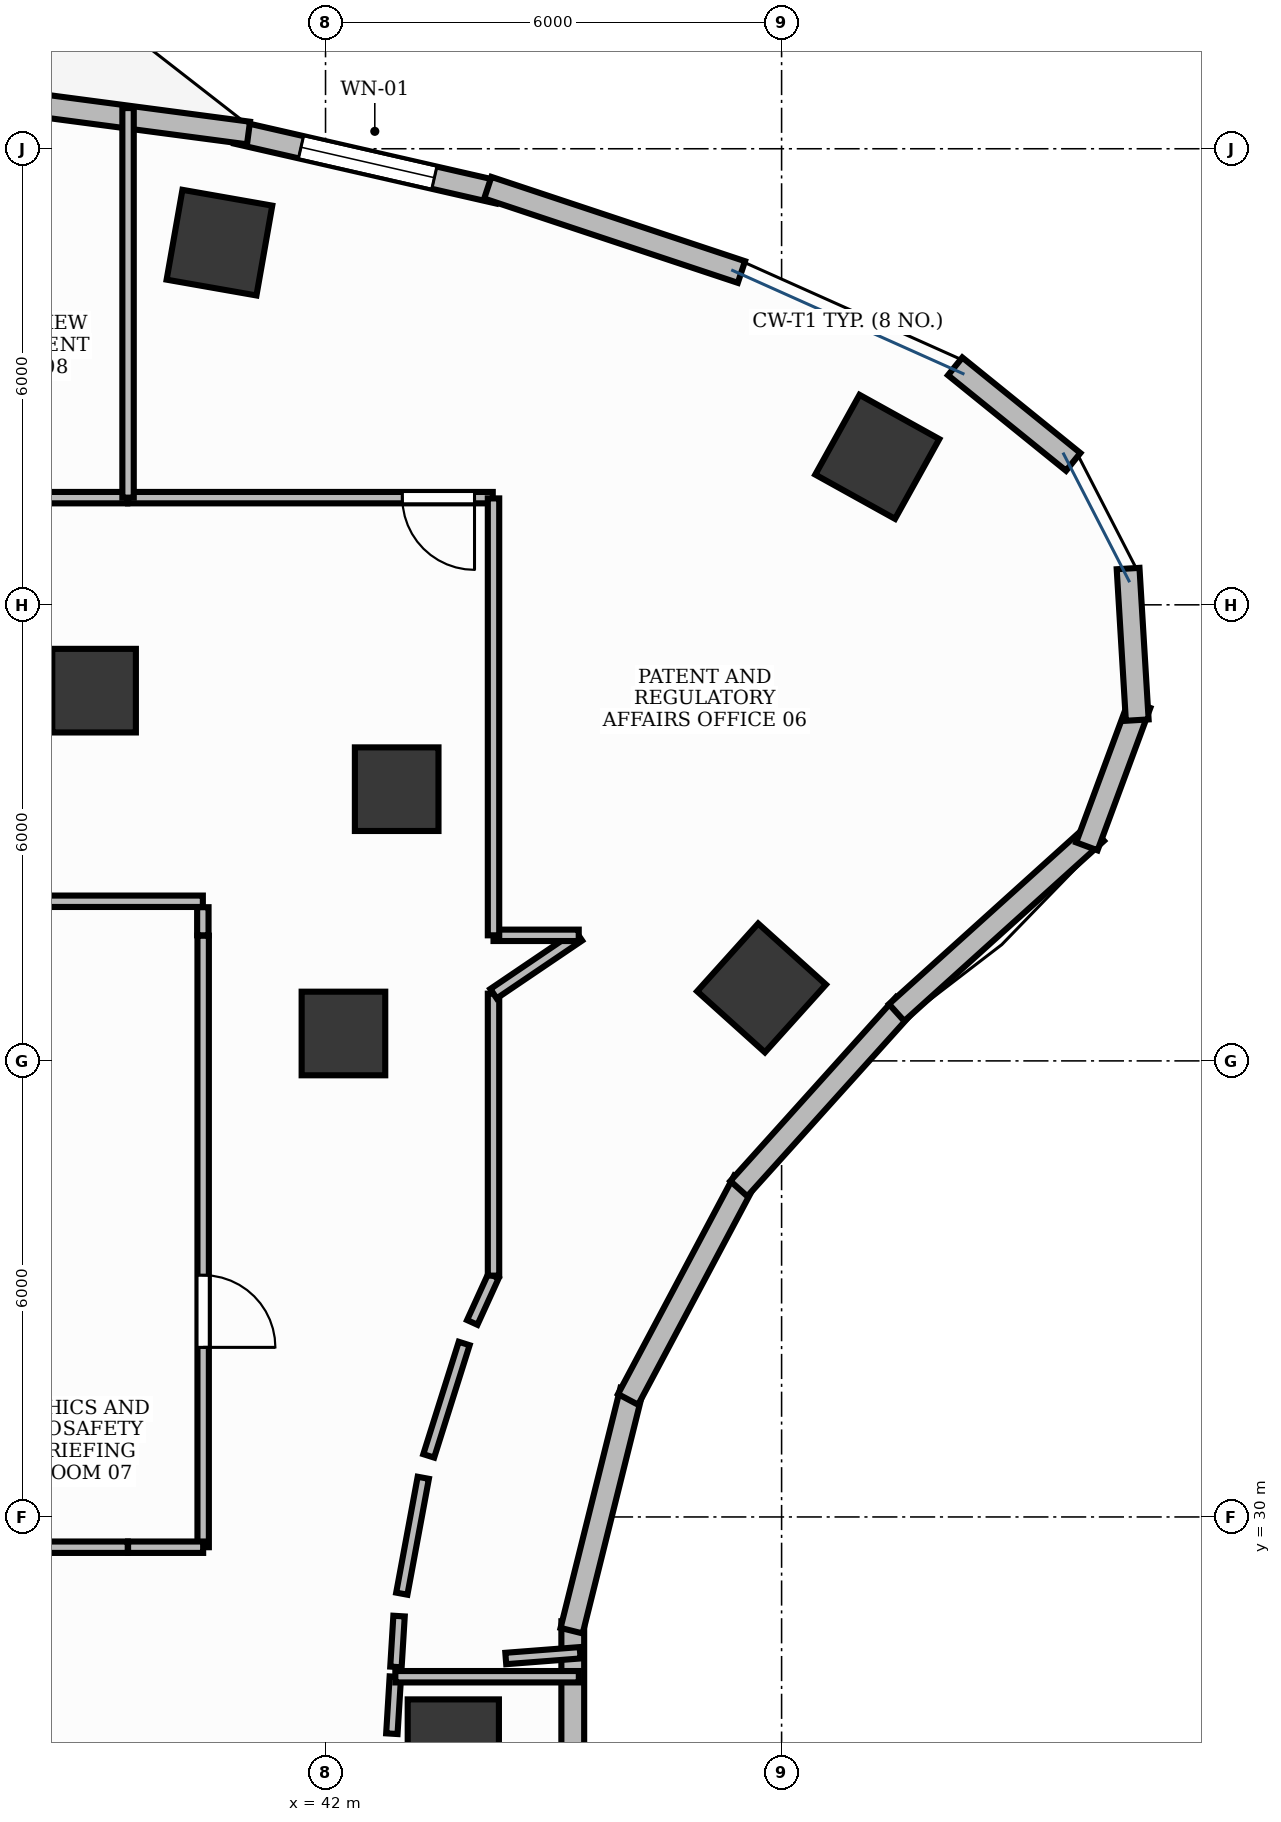
"""IFC4 building model, lengths in metres.
Left out: names, types, materials, properties, quantities, classifications, styles, units other than length and angle.
Written with IfcOpenShell. Run it as: python <this file> out.ifc"""

import sys

from ifc_helpers import new_model, si_unit, direction, frame, frame_2d, origin, origin_2d, place, context, subcontext, project, spatial, rectangle, extrude, element, fill, save


model = new_model("IFC4")
c1 = context("Model", 3, precision=1e-05, world=origin(), true_north=direction((0.0, 1.0)))
c2 = subcontext(c1, "Body", "Model", "MODEL_VIEW")
j1 = project(units=[si_unit("LENGTHUNIT", "METRE"), si_unit("PLANEANGLEUNIT", "RADIAN")], contexts=[c1])
p1 = place(None, origin())
s1 = spatial("IfcSite", under=j1, at=p1, CompositionType="ELEMENT")
p2 = place(p1, origin())
s2 = spatial("IfcBuilding", under=s1, at=p2, CompositionType="ELEMENT")
p3 = place(p2, frame((0.0, 0.0, 127.8)))
s3 = spatial("IfcBuildingStorey", under=s2, at=p3, CompositionType="ELEMENT", Elevation=127.8)
p4 = place(p3, frame((49.259, 43.947, -0.0), z_axis=(0.0, 0.0, 1.0), x_axis=(-0.874535078577, 0.484962262797, 0.0)))
e1 = element("IfcColumn", 1, at=p4, inside=s3, PredefinedType="COLUMN", context=c2, shape_type="SweptSolid", body=[
    extrude(rectangle(XDim=1.2, YDim=1.2, at=origin_2d()), origin(), (0.0, 0.0, 1.0), 3.901),
])
p5 = place(p3, frame((42.936, 39.575, -0.0), z_axis=(0.0, 0.0, 1.0), x_axis=(1.0, 0.0, 0.0)))
e2 = element("IfcColumn", 2, at=p5, inside=s3, PredefinedType="COLUMN", context=c2, shape_type="SweptSolid", body=[
    extrude(rectangle(XDim=1.1, YDim=1.1, at=origin_2d()), origin(), (0.0, 0.0, 1.0), 3.901),
])
p6 = place(p3, frame((40.604, 46.765, -0.0), z_axis=(0.0, 0.0, 1.0), x_axis=(-0.984868307662, 0.173304404339, 0.0)))
e3 = element("IfcColumn", 3, at=p6, inside=s3, PredefinedType="COLUMN", context=c2, shape_type="SweptSolid", body=[
    extrude(rectangle(XDim=1.2, YDim=1.2, at=origin_2d()), origin(), (0.0, 0.0, 1.0), 3.901),
])
p7 = place(p3, frame((38.955, 40.871, -0.0), z_axis=(0.0, 0.0, 1.0), x_axis=(1.0, 0.0, 0.0)))
e4 = element("IfcColumn", 4, at=p7, inside=s3, PredefinedType="COLUMN", context=c2, shape_type="SweptSolid", body=[
    extrude(rectangle(XDim=1.1, YDim=1.1, at=origin_2d()), origin(), (0.0, 0.0, 1.0), 3.901),
])
for number, where, z_axis, x_axis in (
    (5, (43.681, 27.0, -0.0), (0.0, 0.0, 1.0), (0.0, 1.0, 0.0)),
    (6, (47.736, 36.96, -0.0), (0.0, 0.0, 1.0), (0.669, 0.743, 0.0)),
):
    element("IfcColumn", number, at=place(p3, frame(where, z_axis=z_axis, x_axis=x_axis)), inside=s3, PredefinedType="COLUMN", context=c2, shape_type="SweptSolid", body=[
        extrude(rectangle(XDim=1.2, YDim=1.2, at=origin_2d()), origin(), (0.0, 0.0, 1.0), 3.901),
    ])
p8 = place(p3, frame((42.236, 36.361, -0.0), z_axis=(0.0, 0.0, 1.0), x_axis=(1.0, 0.0, 0.0)))
e7 = element("IfcColumn", 7, at=p8, inside=s3, PredefinedType="COLUMN", context=c2, shape_type="SweptSolid", body=[
    extrude(rectangle(XDim=1.1, YDim=1.1, at=origin_2d()), origin(), (0.0, 0.0, 1.0), 3.901),
])
p9 = place(p3, frame((44.278, 47.426, 0.0), z_axis=(0.0, 0.0, 1.0), x_axis=(-0.974836214244, 0.222922307989, 0.0)))
e8 = element("IfcWall", 8, at=p9, inside=s3, PredefinedType="STANDARD", context=c2, shape_type="SweptSolid", body=[
    extrude(rectangle(XDim=3.535, YDim=0.3, at=frame_2d((1.768, 0.0))), origin(), (0.0, 0.0, 1.0), 3.9),
])
p10 = place(p9, frame((0.868, 0.0, 0.9)))
e9 = element("IfcOpeningElement", 9, at=p10, cuts=e8, PredefinedType="OPENING", context=c2, shape_type="SweptSolid", body=[
    extrude(rectangle(XDim=1.8, YDim=2.1, at=frame_2d((0.9, 1.05))), frame((0.0, 0.165, 0.0), z_axis=(0.0, -1.0, 0.0), x_axis=(1.0, 0.0, 0.0)), (0.0, 0.0, 1.0), 0.33),
])
p11 = place(p3, frame((47.471, 46.378, 0.0), z_axis=(0.0, 0.0, 1.0), x_axis=(-0.948946814906, 0.315436114737, 0.0)))
e10 = element("IfcWall", 10, at=p11, inside=s3, PredefinedType="STANDARD", context=c2, shape_type="SweptSolid", body=[
    extrude(rectangle(XDim=3.516, YDim=0.3, at=frame_2d((1.758, 0.0))), origin(), (0.0, 0.0, 1.0), 3.9),
])
p12 = place(p3, frame((40.987, 48.207, 0.0), z_axis=(0.0, 0.0, 1.0), x_axis=(-0.991372969521, 0.131071107816, 0.0)))
e11 = element("IfcWall", 11, at=p12, inside=s3, PredefinedType="STANDARD", context=c2, shape_type="SweptSolid", body=[
    extrude(rectangle(XDim=3.615, YDim=0.3, at=frame_2d((1.808, 0.0))), origin(), (0.0, 0.0, 1.0), 3.47),
])
p13 = place(p3, frame((45.253, 25.372, 0.0), z_axis=(0.0, 0.0, 1.0), x_axis=(0.0, 1.0, 0.0)))
e12 = element("IfcWall", 12, at=p13, inside=s3, PredefinedType="STANDARD", context=c2, shape_type="SweptSolid", body=[
    extrude(rectangle(XDim=3.255, YDim=0.3, at=frame_2d((1.628, 0.0))), origin(), (0.0, 0.0, 1.0), 3.9),
])
p14 = place(p3, frame((45.238, 28.504, 0.0), z_axis=(0.0, 0.0, 1.0), x_axis=(0.241900409149, 0.970301083197, 0.0)))
e13 = element("IfcWall", 13, at=p14, inside=s3, PredefinedType="STANDARD", context=c2, shape_type="SweptSolid", body=[
    extrude(rectangle(XDim=3.256, YDim=0.3, at=frame_2d((1.628, 0.0))), origin(), (0.0, 0.0, 1.0), 3.9),
])
p15 = place(p3, frame((45.98, 31.547, 0.0), z_axis=(0.0, 0.0, 1.0), x_axis=(0.469451284634, 0.882958374645, 0.0)))
e14 = element("IfcWall", 14, at=p15, inside=s3, PredefinedType="STANDARD", context=c2, shape_type="SweptSolid", body=[
    extrude(rectangle(XDim=3.256, YDim=0.3, at=frame_2d((1.628, 0.0))), origin(), (0.0, 0.0, 1.0), 3.9),
])
p16 = place(p3, frame((47.437, 34.319, 0.0), z_axis=(0.0, 0.0, 1.0), x_axis=(0.669167727967, 0.743111399353, 0.0)))
e15 = element("IfcWall", 15, at=p16, inside=s3, PredefinedType="STANDARD", context=c2, shape_type="SweptSolid", body=[
    extrude(rectangle(XDim=3.255, YDim=0.3, at=frame_2d((1.628, 0.0))), origin(), (0.0, 0.0, 1.0), 3.9),
])
p17 = place(p3, frame((49.513, 36.636, 0.0), z_axis=(0.0, 0.0, 1.0), x_axis=(0.74255963233, 0.669779958221, 0.0)))
e16 = element("IfcWall", 16, at=p17, inside=s3, PredefinedType="STANDARD", context=c2, shape_type="SweptSolid", body=[
    extrude(rectangle(XDim=3.539, YDim=0.3, at=frame_2d((1.77, 0.0))), origin(), (0.0, 0.0, 1.0), 3.9),
])
p18 = place(p3, frame((52.016, 38.822, 0.0), z_axis=(0.0, 0.0, 1.0), x_axis=(0.347370087337, 0.937728117539, 0.0)))
e17 = element("IfcWall", 17, at=p18, inside=s3, PredefinedType="STANDARD", context=c2, shape_type="SweptSolid", body=[
    extrude(rectangle(XDim=1.997, YDim=0.3, at=frame_2d((0.999, 0.0))), origin(), (0.0, 0.0, 1.0), 3.9),
])
for number, where, z_axis, x_axis in (
    (18, (52.679, 40.483, 0.0), (0.0, 0.0, 1.0), (-0.06, 0.998, 0.0)),
    (19, (51.836, 43.881, 0.0), (0.0, 0.0, 1.0), (-0.777, 0.629, 0.0)),
):
    element("IfcWall", number, at=place(p3, frame(where, z_axis=z_axis, x_axis=x_axis)), inside=s3, PredefinedType="STANDARD", context=c2, shape_type="SweptSolid", body=[
        extrude(rectangle(XDim=1.998, YDim=0.3, at=frame_2d((0.999, 0.0))), origin(), (0.0, 0.0, 1.0), 3.9),
    ])
p19 = place(p3, frame((44.2, 43.41, 0.0), z_axis=(0.0, 0.0, 1.0), x_axis=(-1.0, 0.0, 0.0)))
e20 = element("IfcWall", 20, at=p19, inside=s3, PredefinedType="PARTITIONING", context=c2, shape_type="SweptSolid", body=[
    extrude(rectangle(XDim=4.798, YDim=0.15, at=frame_2d((2.399, 0.0))), origin(), (0.0, 0.0, 1.0), 2.91),
])
p20 = place(p19, frame((0.24, 0.0, 0.0)))
e21 = element("IfcOpeningElement", 21, at=p20, cuts=e20, PredefinedType="OPENING", context=c2, shape_type="SweptSolid", body=[
    extrude(rectangle(XDim=0.95, YDim=2.15, at=frame_2d((0.475, 1.075))), frame((0.0, 0.09, 0.0), z_axis=(0.0, -1.0, 0.0), x_axis=(1.0, 0.0, 0.0)), (0.0, 0.0, 1.0), 0.18),
])
p21 = place(p3, frame((40.39, 37.648, 0.0), z_axis=(0.0, 0.0, 1.0), x_axis=(0.0, -1.0, 0.0)))
e22 = element("IfcWall", 22, at=p21, inside=s3, PredefinedType="PARTITIONING", context=c2, shape_type="SweptSolid", body=[
    extrude(rectangle(XDim=8.046, YDim=0.15, at=frame_2d((4.023, 0.0))), origin(), (0.0, 0.0, 1.0), 2.91),
])
p22 = place(p21, frame((4.467, 0.0, 0.0)))
e23 = element("IfcOpeningElement", 23, at=p22, cuts=e22, PredefinedType="OPENING", context=c2, shape_type="SweptSolid", body=[
    extrude(rectangle(XDim=0.95, YDim=2.15, at=frame_2d((0.475, 1.075))), frame((0.0, 0.09, 0.0), z_axis=(0.0, -1.0, 0.0), x_axis=(1.0, 0.0, 0.0)), (0.0, 0.0, 1.0), 0.18),
])
p23 = place(p3, frame((39.392, 43.41, 0.0), z_axis=(0.0, 0.0, 1.0), x_axis=(-1.0, 0.0, 0.0)))
e24 = element("IfcWall", 24, at=p23, inside=s3, PredefinedType="PARTITIONING", context=c2, shape_type="SweptSolid", body=[
    extrude(rectangle(XDim=3.842, YDim=0.15, at=frame_2d((1.921, 0.0))), origin(), (0.0, 0.0, 1.0), 2.91),
])
p24 = place(p23, frame((2.402, 0.0, 0.0)))
e25 = element("IfcOpeningElement", 25, at=p24, cuts=e24, PredefinedType="OPENING", context=c2, shape_type="SweptSolid", body=[
    extrude(rectangle(XDim=0.95, YDim=2.15, at=frame_2d((0.475, 1.075))), frame((0.0, 0.09, 0.0), z_axis=(0.0, -1.0, 0.0), x_axis=(1.0, 0.0, 0.0)), (0.0, 0.0, 1.0), 0.18),
])
p25 = place(p3, frame((42.873, 27.149, 0.0), z_axis=(0.0, 0.0, 1.0), x_axis=(0.061143125985, 0.998129008768, 0.0)))
e26 = element("IfcWall", 26, at=p25, inside=s3, PredefinedType="PARTITIONING", context=c2, shape_type="SweptSolid", body=[
    extrude(rectangle(XDim=0.751, YDim=0.15, at=frame_2d((0.375, 0.0))), origin(), (0.0, 0.0, 1.0), 2.91),
])
p26 = place(p3, frame((42.918, 27.898, 0.0), z_axis=(0.0, 0.0, 1.0), x_axis=(1.0, 0.0, 0.0)))
e27 = element("IfcWall", 27, at=p26, inside=s3, PredefinedType="PARTITIONING", context=c2, shape_type="SweptSolid", body=[
    extrude(rectangle(XDim=2.414, YDim=0.15, at=frame_2d((1.207, 0.0))), origin(), (0.0, 0.0, 1.0), 2.91),
])
p27 = place(p3, frame((45.35, 28.213, 0.0), z_axis=(0.0, 0.0, 1.0), x_axis=(-0.997039830609, -0.076886775058, 0.0)))
e28 = element("IfcWall", 28, at=p27, inside=s3, PredefinedType="PARTITIONING", context=c2, shape_type="SweptSolid", body=[
    extrude(rectangle(XDim=0.981, YDim=0.15, at=frame_2d((0.491, 0.0))), origin(), (0.0, 0.0, 1.0), 2.91),
])
p28 = place(p3, frame((42.926, 28.027, 0.0), z_axis=(0.0, 0.0, 1.0), x_axis=(0.061176697513, 0.998126951686, 0.0)))
e29 = element("IfcWall", 29, at=p28, inside=s3, PredefinedType="PARTITIONING", context=c2, shape_type="SweptSolid", body=[
    extrude(rectangle(XDim=0.67, YDim=0.15, at=frame_2d((0.335, 0.0))), origin(), (0.0, 0.0, 1.0), 2.91),
])
p29 = place(p3, frame((43.003, 28.991, 0.0), z_axis=(0.0, 0.0, 1.0), x_axis=(0.182168192784, 0.983267384559, 0.0)))
e30 = element("IfcWall", 30, at=p29, inside=s3, PredefinedType="PARTITIONING", context=c2, shape_type="SweptSolid", body=[
    extrude(rectangle(XDim=1.551, YDim=0.15, at=frame_2d((0.775, 0.0))), origin(), (0.0, 0.0, 1.0), 2.91),
])
p30 = place(p3, frame((43.358, 30.803, 0.0), z_axis=(0.0, 0.0, 1.0), x_axis=(0.300641414783, 0.953737248783, 0.0)))
e31 = element("IfcWall", 31, at=p30, inside=s3, PredefinedType="PARTITIONING", context=c2, shape_type="SweptSolid", body=[
    extrude(rectangle(XDim=1.55, YDim=0.15, at=frame_2d((0.775, 0.0))), origin(), (0.0, 0.0, 1.0), 2.91),
])
p31 = place(p3, frame((43.93, 32.559, 0.0), z_axis=(0.0, 0.0, 1.0), x_axis=(0.414377467152, 0.910105111905, 0.0)))
e32 = element("IfcWall", 32, at=p31, inside=s3, PredefinedType="PARTITIONING", context=c2, shape_type="SweptSolid", body=[
    extrude(rectangle(XDim=0.672, YDim=0.15, at=frame_2d((0.336, 0.0))), origin(), (0.0, 0.0, 1.0), 2.91),
])
p32 = place(p3, frame((44.21, 33.175, 0.0), z_axis=(0.0, 0.0, 1.0), x_axis=(0.0, 1.0, 0.0)))
e33 = element("IfcWall", 33, at=p32, inside=s3, PredefinedType="PARTITIONING", context=c2, shape_type="SweptSolid", body=[
    extrude(rectangle(XDim=3.709, YDim=0.15, at=frame_2d((1.854, 0.0))), origin(), (0.0, 0.0, 1.0), 2.91),
])
p33 = place(p3, frame((44.21, 36.884, 0.0), z_axis=(0.0, 0.0, 1.0), x_axis=(0.828042645571, 0.560665120295, 0.0)))
e34 = element("IfcWall", 34, at=p33, inside=s3, PredefinedType="PARTITIONING", context=c2, shape_type="SweptSolid", body=[
    extrude(rectangle(XDim=1.357, YDim=0.15, at=frame_2d((0.678, 0.0))), origin(), (0.0, 0.0, 1.0), 2.91),
])
p34 = place(p3, frame((45.331, 37.652, 0.0), z_axis=(0.0, 0.0, 1.0), x_axis=(-1.0, 0.0, 0.0)))
e35 = element("IfcWall", 35, at=p34, inside=s3, PredefinedType="PARTITIONING", context=c2, shape_type="SweptSolid", body=[
    extrude(rectangle(XDim=1.121, YDim=0.15, at=frame_2d((0.561, 0.0))), origin(), (0.0, 0.0, 1.0), 2.91),
])
p35 = place(p3, frame((44.21, 37.652, 0.0), z_axis=(0.0, 0.0, 1.0), x_axis=(0.0, 1.0, 0.0)))
e36 = element("IfcWall", 36, at=p35, inside=s3, PredefinedType="PARTITIONING", context=c2, shape_type="SweptSolid", body=[
    extrude(rectangle(XDim=5.748, YDim=0.15, at=frame_2d((2.874, 0.0))), origin(), (0.0, 0.0, 1.0), 2.91),
])
p36 = place(p3, frame((39.402, 43.41, 0.0), z_axis=(0.0, 0.0, 1.0), x_axis=(0.0, 1.0, 0.0)))
e37 = element("IfcWall", 37, at=p36, inside=s3, PredefinedType="PARTITIONING", context=c2, shape_type="SweptSolid", body=[
    extrude(rectangle(XDim=5.125, YDim=0.15, at=frame_2d((2.563, 0.0))), origin(), (0.0, 0.0, 1.0), 2.91),
])
p37 = place(p3, frame((40.39, 29.602, 0.0), z_axis=(0.0, 0.0, 1.0), x_axis=(-1.0, 0.0, 0.0)))
e38 = element("IfcWall", 38, at=p37, inside=s3, PredefinedType="PARTITIONING", context=c2, shape_type="SweptSolid", body=[
    extrude(rectangle(XDim=0.988, YDim=0.15, at=frame_2d((0.494, 0.0))), origin(), (0.0, 0.0, 1.0), 2.91),
])
p38 = place(p3, frame((39.398, 29.602, 0.0), z_axis=(0.0, 0.0, 1.0), x_axis=(-1.0, 0.0, 0.0)))
e39 = element("IfcWall", 39, at=p38, inside=s3, PredefinedType="PARTITIONING", context=c2, shape_type="SweptSolid", body=[
    extrude(rectangle(XDim=2.038, YDim=0.15, at=frame_2d((1.019, 0.0))), origin(), (0.0, 0.0, 1.0), 2.91),
])
p39 = place(p3, frame((37.21, 38.1, 0.0), z_axis=(0.0, 0.0, 1.0), x_axis=(1.0, 0.0, 0.0)))
e40 = element("IfcWall", 40, at=p39, inside=s3, PredefinedType="PARTITIONING", context=c2, shape_type="SweptSolid", body=[
    extrude(rectangle(XDim=3.176, YDim=0.15, at=frame_2d((1.588, 0.0))), origin(), (0.0, 0.0, 1.0), 2.91),
])
p40 = place(p3, frame((40.386, 38.022, 0.0), z_axis=(0.0, 0.0, 1.0), x_axis=(0.0, -1.0, 0.0)))
e41 = element("IfcWall", 41, at=p40, inside=s3, PredefinedType="PARTITIONING", context=c2, shape_type="SweptSolid", body=[
    extrude(rectangle(XDim=0.37, YDim=0.15, at=frame_2d((0.185, 0.0))), origin(), (0.0, 0.0, 1.0), 2.91),
])
p41 = place(p10, origin())
e42 = element("IfcWindow", 42, at=p41, inside=s3, PartitioningType="SINGLE_PANEL", PredefinedType="WINDOW", context=c2, shape_type="SweptSolid", body=[
    extrude(rectangle(XDim=1.8, YDim=2.1, at=frame_2d((0.9, 1.05))), frame((0.0, 0.03, 0.0), z_axis=(0.0, -1.0, 0.0), x_axis=(1.0, 0.0, 0.0)), (0.0, 0.0, 1.0), 0.06),
])
fill(e9, e42)
p42 = place(p20, origin())
e43 = element("IfcDoor", 43, at=p42, inside=s3, OperationType="SINGLE_SWING_LEFT", PredefinedType="DOOR", context=c2, shape_type="SweptSolid", body=[
    extrude(rectangle(XDim=0.95, YDim=2.15, at=frame_2d((0.475, 1.075))), frame((0.0, 0.025, 0.0), z_axis=(0.0, -1.0, 0.0), x_axis=(1.0, 0.0, 0.0)), (0.0, 0.0, 1.0), 0.05),
])
fill(e21, e43)
p43 = place(p22, origin())
e44 = element("IfcDoor", 44, at=p43, inside=s3, OperationType="SINGLE_SWING_RIGHT", PredefinedType="DOOR", context=c2, shape_type="SweptSolid", body=[
    extrude(rectangle(XDim=0.95, YDim=2.15, at=frame_2d((0.475, 1.075))), frame((0.0, 0.025, 0.0), z_axis=(0.0, -1.0, 0.0), x_axis=(1.0, 0.0, 0.0)), (0.0, 0.0, 1.0), 0.05),
])
fill(e23, e44)
save(model, sys.argv[1])
